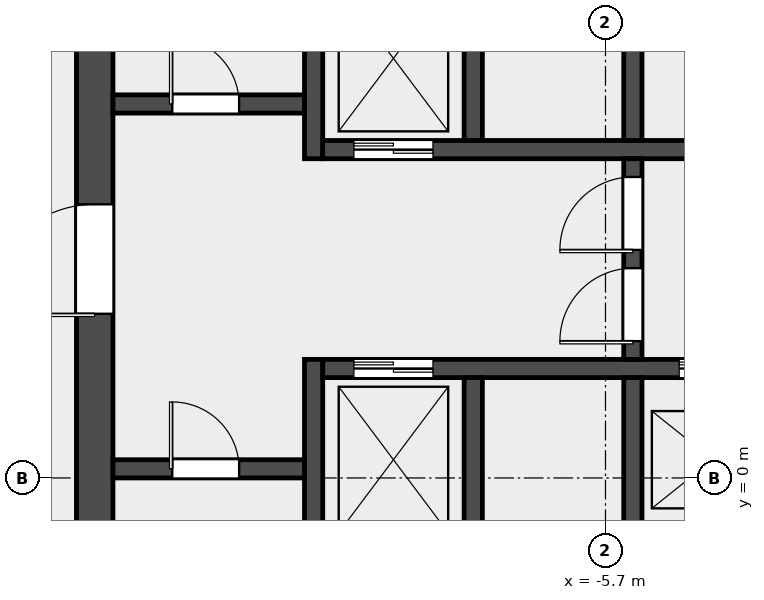
"""IFC4 building model, lengths in metres.
Left out: names, types, materials, properties, quantities, classifications, styles, units other than length and angle.
Written with IfcOpenShell. Run it as: python <this file> out.ifc"""

import sys

from ifc_helpers import new_model, si_unit, direction, frame, frame_2d, origin, place, context, subcontext, project, spatial, rectangle, extrude, element, fill, save


model = new_model("IFC4")
c1 = context("Model", 3, precision=1e-05, world=origin(), true_north=direction((0.0, 1.0)))
c2 = subcontext(c1, "Body", "Model", "MODEL_VIEW")
j1 = project(units=[si_unit("LENGTHUNIT", "METRE"), si_unit("PLANEANGLEUNIT", "RADIAN")], contexts=[c1])
p1 = place(None, origin())
s1 = spatial("IfcSite", under=j1, at=p1, CompositionType="ELEMENT")
p2 = place(p1, origin())
s2 = spatial("IfcBuilding", under=s1, at=p2, CompositionType="ELEMENT")
p3 = place(p2, frame((0.0, 0.0, 69.4)))
s3 = spatial("IfcBuildingStorey", under=s2, at=p3, CompositionType="ELEMENT", Elevation=69.4)
p4 = place(p3, frame((-14.1, -6.6, 0.0), z_axis=(0.0, 0.0, 1.0), x_axis=(0.0, 1.0, 0.0)))
e1 = element("IfcWall", 1, at=p4, inside=s3, PredefinedType="SHEAR", context=c2, shape_type="SweptSolid", body=[
    extrude(rectangle(XDim=19.5, YDim=0.6, at=frame_2d((9.75, 0.0))), origin(), (0.0, 0.0, 1.0), 4.5),
])
p5 = place(p4, frame((9.3, 0.0, 0.0)))
e2 = element("IfcOpeningElement", 2, at=p5, cuts=e1, PredefinedType="OPENING", context=c2, shape_type="SweptSolid", body=[
    extrude(rectangle(XDim=1.8, YDim=2.1, at=frame_2d((0.9, 1.05))), frame((0.0, 0.312, 0.0), z_axis=(0.0, -1.0, 0.0), x_axis=(1.0, 0.0, 0.0)), (0.0, 0.0, 1.0), 0.624),
])
p6 = place(p3, frame((-10.5, -6.6, 0.0), z_axis=(0.0, 0.0, 1.0), x_axis=(0.0, 1.0, 0.0)))
e3 = element("IfcWall", 3, at=p6, inside=s3, PredefinedType="SHEAR", context=c2, shape_type="SweptSolid", body=[
    extrude(rectangle(XDim=8.55, YDim=0.3, at=frame_2d((4.275, 0.0))), origin(), (0.0, 0.0, 1.0), 4.5),
])
p7 = place(p3, frame((-10.5, 5.25, 0.0), z_axis=(0.0, 0.0, 1.0), x_axis=(0.0, 1.0, 0.0)))
e4 = element("IfcWall", 4, at=p7, inside=s3, PredefinedType="SHEAR", context=c2, shape_type="SweptSolid", body=[
    extrude(rectangle(XDim=7.65, YDim=0.3, at=frame_2d((3.825, 0.0))), origin(), (0.0, 0.0, 1.0), 4.5),
])
p8 = place(p3, frame((-13.8, 0.15, 0.0), z_axis=(0.0, 0.0, 1.0), x_axis=(1.0, 0.0, 0.0)))
e5 = element("IfcWall", 5, at=p8, inside=s3, PredefinedType="SOLIDWALL", context=c2, shape_type="SweptSolid", body=[
    extrude(rectangle(XDim=3.15, YDim=0.3, at=frame_2d((1.575, 0.0))), origin(), (0.0, 0.0, 1.0), 4.5),
])
p9 = place(p8, frame((0.975, 0.0, 0.0)))
e6 = element("IfcOpeningElement", 6, at=p9, cuts=e5, PredefinedType="OPENING", context=c2, shape_type="SweptSolid", body=[
    extrude(rectangle(XDim=1.1, YDim=2.1, at=frame_2d((0.55, 1.05))), frame((0.0, 0.162, 0.0), z_axis=(0.0, -1.0, 0.0), x_axis=(1.0, 0.0, 0.0)), (0.0, 0.0, 1.0), 0.324),
])
p10 = place(p3, frame((-13.8, 6.15, 0.0), z_axis=(0.0, 0.0, 1.0), x_axis=(1.0, 0.0, 0.0)))
e7 = element("IfcWall", 7, at=p10, inside=s3, PredefinedType="SOLIDWALL", context=c2, shape_type="SweptSolid", body=[
    extrude(rectangle(XDim=3.15, YDim=0.3, at=frame_2d((1.575, 0.0))), origin(), (0.0, 0.0, 1.0), 4.5),
])
p11 = place(p10, frame((0.975, 0.0, 0.0)))
e8 = element("IfcOpeningElement", 8, at=p11, cuts=e7, PredefinedType="OPENING", context=c2, shape_type="SweptSolid", body=[
    extrude(rectangle(XDim=1.1, YDim=2.1, at=frame_2d((0.55, 1.05))), frame((0.0, 0.162, 0.0), z_axis=(0.0, -1.0, 0.0), x_axis=(1.0, 0.0, 0.0)), (0.0, 0.0, 1.0), 0.324),
])
p12 = place(p3, frame((-10.35, 1.8, 0.0), z_axis=(0.0, 0.0, 1.0), x_axis=(1.0, 0.0, 0.0)))
e9 = element("IfcWall", 9, at=p12, inside=s3, PredefinedType="SOLIDWALL", context=c2, shape_type="SweptSolid", body=[
    extrude(rectangle(XDim=20.7, YDim=0.3, at=frame_2d((10.35, 0.0))), origin(), (0.0, 0.0, 1.0), 4.5),
])
p13 = place(p12, frame((0.512, 0.0, 0.0)))
e10 = element("IfcOpeningElement", 10, at=p13, cuts=e9, PredefinedType="OPENING", context=c2, shape_type="SweptSolid", body=[
    extrude(rectangle(XDim=1.3, YDim=2.1, at=frame_2d((0.65, 1.05))), frame((0.0, 0.162, 0.0), z_axis=(0.0, -1.0, 0.0), x_axis=(1.0, 0.0, 0.0)), (0.0, 0.0, 1.0), 0.324),
])
p14 = place(p12, frame((5.863, 0.0, 0.0)))
e11 = element("IfcOpeningElement", 11, at=p14, cuts=e9, PredefinedType="OPENING", context=c2, shape_type="SweptSolid", body=[
    extrude(rectangle(XDim=1.1, YDim=2.1, at=frame_2d((0.55, 1.05))), frame((0.0, 0.162, 0.0), z_axis=(0.0, -1.0, 0.0), x_axis=(1.0, 0.0, 0.0)), (0.0, 0.0, 1.0), 0.324),
])
p15 = place(p12, frame((8.488, 0.0, 0.0)))
e12 = element("IfcOpeningElement", 12, at=p15, cuts=e9, PredefinedType="OPENING", context=c2, shape_type="SweptSolid", body=[
    extrude(rectangle(XDim=1.1, YDim=2.1, at=frame_2d((0.55, 1.05))), frame((0.0, 0.162, 0.0), z_axis=(0.0, -1.0, 0.0), x_axis=(1.0, 0.0, 0.0)), (0.0, 0.0, 1.0), 0.324),
])
p16 = place(p12, frame((11.113, 0.0, 0.0)))
e13 = element("IfcOpeningElement", 13, at=p16, cuts=e9, PredefinedType="OPENING", context=c2, shape_type="SweptSolid", body=[
    extrude(rectangle(XDim=1.1, YDim=2.1, at=frame_2d((0.55, 1.05))), frame((0.0, 0.162, 0.0), z_axis=(0.0, -1.0, 0.0), x_axis=(1.0, 0.0, 0.0)), (0.0, 0.0, 1.0), 0.324),
])
p17 = place(p12, frame((13.738, 0.0, 0.0)))
e14 = element("IfcOpeningElement", 14, at=p17, cuts=e9, PredefinedType="OPENING", context=c2, shape_type="SweptSolid", body=[
    extrude(rectangle(XDim=1.1, YDim=2.1, at=frame_2d((0.55, 1.05))), frame((0.0, 0.162, 0.0), z_axis=(0.0, -1.0, 0.0), x_axis=(1.0, 0.0, 0.0)), (0.0, 0.0, 1.0), 0.324),
])
p18 = place(p12, frame((16.363, 0.0, 0.0)))
e15 = element("IfcOpeningElement", 15, at=p18, cuts=e9, PredefinedType="OPENING", context=c2, shape_type="SweptSolid", body=[
    extrude(rectangle(XDim=1.1, YDim=2.1, at=frame_2d((0.55, 1.05))), frame((0.0, 0.162, 0.0), z_axis=(0.0, -1.0, 0.0), x_axis=(1.0, 0.0, 0.0)), (0.0, 0.0, 1.0), 0.324),
])
p19 = place(p12, frame((18.988, 0.0, 0.0)))
e16 = element("IfcOpeningElement", 16, at=p19, cuts=e9, PredefinedType="OPENING", context=c2, shape_type="SweptSolid", body=[
    extrude(rectangle(XDim=1.1, YDim=2.1, at=frame_2d((0.55, 1.05))), frame((0.0, 0.162, 0.0), z_axis=(0.0, -1.0, 0.0), x_axis=(1.0, 0.0, 0.0)), (0.0, 0.0, 1.0), 0.324),
])
p20 = place(p3, frame((-10.35, 5.4, 0.0), z_axis=(0.0, 0.0, 1.0), x_axis=(1.0, 0.0, 0.0)))
e17 = element("IfcWall", 17, at=p20, inside=s3, PredefinedType="SOLIDWALL", context=c2, shape_type="SweptSolid", body=[
    extrude(rectangle(XDim=20.7, YDim=0.3, at=frame_2d((10.35, 0.0))), origin(), (0.0, 0.0, 1.0), 4.5),
])
p21 = place(p20, frame((0.512, 0.0, 0.0)))
e18 = element("IfcOpeningElement", 18, at=p21, cuts=e17, PredefinedType="OPENING", context=c2, shape_type="SweptSolid", body=[
    extrude(rectangle(XDim=1.3, YDim=2.1, at=frame_2d((0.65, 1.05))), frame((0.0, 0.162, 0.0), z_axis=(0.0, -1.0, 0.0), x_axis=(1.0, 0.0, 0.0)), (0.0, 0.0, 1.0), 0.324),
])
for number, where, z_axis, x_axis in (
    (19, (-7.875, -1.05, 0.0), (0.0, 0.0, 1.0), (0.0, 1.0, 0.0)),
    (20, (-5.25, -1.05, 0.0), (0.0, 0.0, 1.0), (0.0, 1.0, 0.0)),
    (21, (-7.875, 5.55, 0.0), (0.0, 0.0, 1.0), (0.0, 1.0, 0.0)),
    (22, (-5.25, 5.55, 0.0), (0.0, 0.0, 1.0), (0.0, 1.0, 0.0)),
):
    element("IfcWall", number, at=place(p3, frame(where, z_axis=z_axis, x_axis=x_axis)), inside=s3, PredefinedType="SOLIDWALL", context=c2, shape_type="SweptSolid", body=[
        extrude(rectangle(XDim=2.7, YDim=0.3, at=frame_2d((1.35, 0.0))), origin(), (0.0, 0.0, 1.0), 4.5),
    ])
p22 = place(p3, frame((-5.25, 1.95, 0.0), z_axis=(0.0, 0.0, 1.0), x_axis=(0.0, 1.0, 0.0)))
e23 = element("IfcWall", 23, at=p22, inside=s3, PredefinedType="SOLIDWALL", context=c2, shape_type="SweptSolid", body=[
    extrude(rectangle(XDim=3.3, YDim=0.3, at=frame_2d((1.65, 0.0))), origin(), (0.0, 0.0, 1.0), 4.5),
])
p23 = place(p22, frame((0.3, 0.0, 0.0)))
e24 = element("IfcOpeningElement", 24, at=p23, cuts=e23, PredefinedType="OPENING", context=c2, shape_type="SweptSolid", body=[
    extrude(rectangle(XDim=1.2, YDim=2.1, at=frame_2d((0.6, 1.05))), frame((0.0, 0.162, 0.0), z_axis=(0.0, -1.0, 0.0), x_axis=(1.0, 0.0, 0.0)), (0.0, 0.0, 1.0), 0.324),
])
p24 = place(p22, frame((1.8, 0.0, 0.0)))
e25 = element("IfcOpeningElement", 25, at=p24, cuts=e23, PredefinedType="OPENING", context=c2, shape_type="SweptSolid", body=[
    extrude(rectangle(XDim=1.2, YDim=2.1, at=frame_2d((0.6, 1.05))), frame((0.0, 0.162, 0.0), z_axis=(0.0, -1.0, 0.0), x_axis=(1.0, 0.0, 0.0)), (0.0, 0.0, 1.0), 0.324),
])
p25 = place(p9, origin())
e26 = element("IfcDoor", 26, at=p25, inside=s3, OperationType="SINGLE_SWING_LEFT", PredefinedType="DOOR", context=c2, shape_type="SweptSolid", body=[
    extrude(rectangle(XDim=1.1, YDim=2.1, at=frame_2d((0.55, 1.05))), frame((0.0, 0.025, 0.0), z_axis=(0.0, -1.0, 0.0), x_axis=(1.0, 0.0, 0.0)), (0.0, 0.0, 1.0), 0.05),
])
fill(e6, e26)
p26 = place(p11, origin())
e27 = element("IfcDoor", 27, at=p26, inside=s3, OperationType="SINGLE_SWING_LEFT", PredefinedType="DOOR", context=c2, shape_type="SweptSolid", body=[
    extrude(rectangle(XDim=1.1, YDim=2.1, at=frame_2d((0.55, 1.05))), frame((0.0, 0.025, 0.0), z_axis=(0.0, -1.0, 0.0), x_axis=(1.0, 0.0, 0.0)), (0.0, 0.0, 1.0), 0.05),
])
fill(e8, e27)
p27 = place(p5, origin())
e28 = element("IfcDoor", 28, at=p27, inside=s3, OperationType="DOUBLE_DOOR_SINGLE_SWING", PredefinedType="DOOR", context=c2, shape_type="SweptSolid", body=[
    extrude(rectangle(XDim=1.8, YDim=2.1, at=frame_2d((0.9, 1.05))), frame((0.0, 0.025, 0.0), z_axis=(0.0, -1.0, 0.0), x_axis=(1.0, 0.0, 0.0)), (0.0, 0.0, 1.0), 0.05),
])
fill(e2, e28)
p28 = place(p23, origin())
e29 = element("IfcDoor", 29, at=p28, inside=s3, OperationType="SINGLE_SWING_LEFT", PredefinedType="DOOR", context=c2, shape_type="SweptSolid", body=[
    extrude(rectangle(XDim=1.2, YDim=2.1, at=frame_2d((0.6, 1.05))), frame((0.0, 0.025, 0.0), z_axis=(0.0, -1.0, 0.0), x_axis=(1.0, 0.0, 0.0)), (0.0, 0.0, 1.0), 0.05),
])
fill(e24, e29)
p29 = place(p24, origin())
e30 = element("IfcDoor", 30, at=p29, inside=s3, OperationType="SINGLE_SWING_RIGHT", PredefinedType="DOOR", context=c2, shape_type="SweptSolid", body=[
    extrude(rectangle(XDim=1.2, YDim=2.1, at=frame_2d((0.6, 1.05))), frame((0.0, 0.025, 0.0), z_axis=(0.0, -1.0, 0.0), x_axis=(1.0, 0.0, 0.0)), (0.0, 0.0, 1.0), 0.05),
])
fill(e25, e30)
p30 = place(p13, origin())
e31 = element("IfcDoor", 31, at=p30, inside=s3, OperationType="DOUBLE_DOOR_SLIDING", PredefinedType="DOOR", context=c2, shape_type="SweptSolid", body=[
    extrude(rectangle(XDim=1.3, YDim=2.1, at=frame_2d((0.65, 1.05))), frame((0.0, 0.025, 0.0), z_axis=(0.0, -1.0, 0.0), x_axis=(1.0, 0.0, 0.0)), (0.0, 0.0, 1.0), 0.05),
])
fill(e10, e31)
p31 = place(p14, origin())
e32 = element("IfcDoor", 32, at=p31, inside=s3, OperationType="DOUBLE_DOOR_SLIDING", PredefinedType="DOOR", context=c2, shape_type="SweptSolid", body=[
    extrude(rectangle(XDim=1.1, YDim=2.1, at=frame_2d((0.55, 1.05))), frame((0.0, 0.025, 0.0), z_axis=(0.0, -1.0, 0.0), x_axis=(1.0, 0.0, 0.0)), (0.0, 0.0, 1.0), 0.05),
])
fill(e11, e32)
p32 = place(p21, origin())
e33 = element("IfcDoor", 33, at=p32, inside=s3, OperationType="DOUBLE_DOOR_SLIDING", PredefinedType="DOOR", context=c2, shape_type="SweptSolid", body=[
    extrude(rectangle(XDim=1.3, YDim=2.1, at=frame_2d((0.65, 1.05))), frame((0.0, 0.025, 0.0), z_axis=(0.0, -1.0, 0.0), x_axis=(1.0, 0.0, 0.0)), (0.0, 0.0, 1.0), 0.05),
])
fill(e18, e33)
save(model, sys.argv[1])
